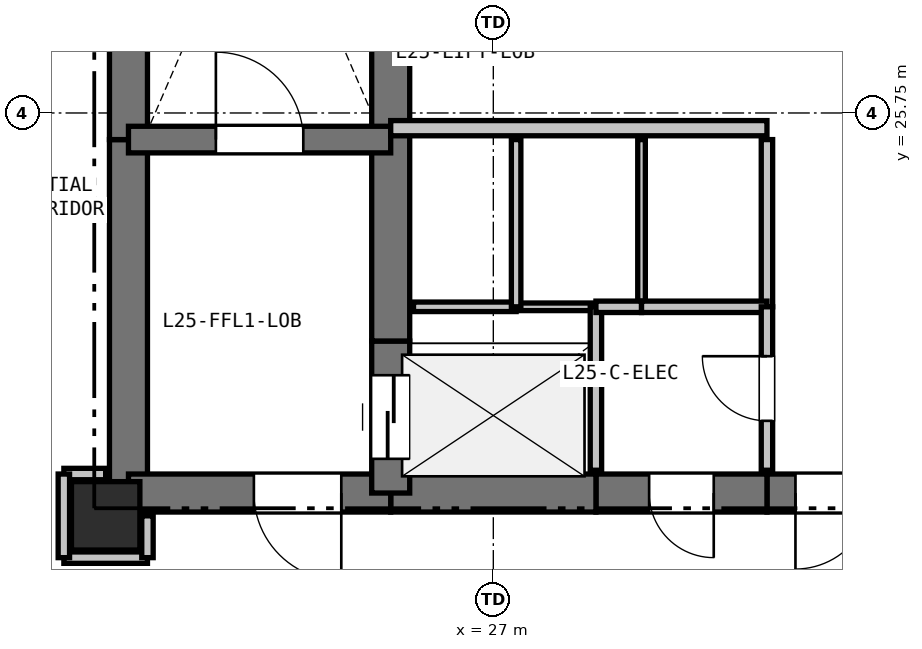
"""IFC4 building model, lengths in metres.
Left out: names, types, materials, properties, quantities, classifications, styles, units other than length and angle.
Written with IfcOpenShell. Run it as: python <this file> out.ifc"""

import sys

from ifc_helpers import new_model, si_unit, direction, frame, frame_2d, origin, origin_2d, place, context, subcontext, project, spatial, rectangle, extrude, element, fill, save


model = new_model("IFC4")
c1 = context("Model", 3, precision=1e-05, world=origin(), true_north=direction((0.0, 1.0)))
c2 = subcontext(c1, "Body", "Model", "MODEL_VIEW")
j1 = project(units=[si_unit("LENGTHUNIT", "METRE"), si_unit("PLANEANGLEUNIT", "RADIAN")], contexts=[c1])
p1 = place(None, origin())
s1 = spatial("IfcSite", under=j1, at=p1, CompositionType="ELEMENT")
p2 = place(p1, origin())
s2 = spatial("IfcBuilding", under=s1, at=p2, CompositionType="ELEMENT")
p3 = place(p2, frame((0.0, 0.0, 93.3)))
s3 = spatial("IfcBuildingStorey", under=s2, at=p3, CompositionType="ELEMENT", Elevation=93.3)
p4 = place(p3, frame((21.9, 20.45, 0.0), z_axis=(0.0, 0.0, 1.0), x_axis=(1.0, 0.0, 0.0)))
e1 = element("IfcColumn", 1, at=p4, inside=s3, PredefinedType="COLUMN", context=c2, shape_type="SweptSolid", body=[
    extrude(rectangle(XDim=0.9, YDim=0.9, at=origin_2d()), origin(), (0.0, 0.0, 1.0), 3.3),
])
p5 = place(p3, frame((22.2, 20.75, 0.0), z_axis=(0.0, 0.0, 1.0), x_axis=(0.0, 1.0, 0.0)))
e2 = element("IfcWall", 2, at=p5, inside=s3, PredefinedType="SHEAR", context=c2, shape_type="SweptSolid", body=[
    extrude(rectangle(XDim=4.65, YDim=0.5, at=frame_2d((2.325, 0.0))), origin(), (0.0, 0.0, 1.0), 3.05),
])
p6 = place(p3, frame((22.2, 25.4, 0.0), z_axis=(0.0, 0.0, 1.0), x_axis=(0.0, 1.0, 0.0)))
e3 = element("IfcWall", 3, at=p6, inside=s3, PredefinedType="SHEAR", context=c2, shape_type="SweptSolid", body=[
    extrude(rectangle(XDim=7.35, YDim=0.5, at=frame_2d((3.675, 0.0))), origin(), (0.0, 0.0, 1.0), 3.05),
])
p7 = place(p3, frame((32.35, 20.75, 0.0), z_axis=(0.0, 0.0, 1.0), x_axis=(-1.0, 0.0, 0.0)))
e4 = element("IfcWall", 4, at=p7, inside=s3, PredefinedType="SHEAR", context=c2, shape_type="SweptSolid", body=[
    extrude(rectangle(XDim=1.75, YDim=0.5, at=frame_2d((0.875, 0.0))), origin(), (0.0, 0.0, 1.0), 3.05),
])
p8 = place(p7, frame((0.375, 0.0, 0.0)))
e5 = element("IfcOpeningElement", 5, at=p8, cuts=e4, PredefinedType="OPENING", context=c2, shape_type="SweptSolid", body=[
    extrude(rectangle(XDim=1.0, YDim=2.15, at=frame_2d((0.5, 1.075))), frame((0.0, 0.26, 0.0), z_axis=(0.0, -1.0, 0.0), x_axis=(1.0, 0.0, 0.0)), (0.0, 0.0, 1.0), 0.52),
])
p9 = place(p3, frame((30.6, 20.75, 0.0), z_axis=(0.0, 0.0, 1.0), x_axis=(-1.0, 0.0, 0.0)))
e6 = element("IfcWall", 6, at=p9, inside=s3, PredefinedType="SHEAR", context=c2, shape_type="SweptSolid", body=[
    extrude(rectangle(XDim=2.25, YDim=0.5, at=frame_2d((1.125, 0.0))), origin(), (0.0, 0.0, 1.0), 3.05),
])
p10 = place(p9, frame((0.7, 0.0, 0.0)))
e7 = element("IfcOpeningElement", 7, at=p10, cuts=e6, PredefinedType="OPENING", context=c2, shape_type="SweptSolid", body=[
    extrude(rectangle(XDim=0.85, YDim=2.1, at=frame_2d((0.425, 1.05))), frame((0.0, 0.26, 0.0), z_axis=(0.0, -1.0, 0.0), x_axis=(1.0, 0.0, 0.0)), (0.0, 0.0, 1.0), 0.52),
])
p11 = place(p3, frame((28.35, 20.75, 0.0), z_axis=(0.0, 0.0, 1.0), x_axis=(-1.0, 0.0, 0.0)))
e8 = element("IfcWall", 8, at=p11, inside=s3, PredefinedType="SHEAR", context=c2, shape_type="SweptSolid", body=[
    extrude(rectangle(XDim=2.7, YDim=0.5, at=frame_2d((1.35, 0.0))), origin(), (0.0, 0.0, 1.0), 3.05),
])
p12 = place(p3, frame((25.65, 20.75, 0.0), z_axis=(0.0, 0.0, 1.0), x_axis=(-1.0, 0.0, 0.0)))
e9 = element("IfcWall", 9, at=p12, inside=s3, PredefinedType="SHEAR", context=c2, shape_type="SweptSolid", body=[
    extrude(rectangle(XDim=3.45, YDim=0.5, at=frame_2d((1.725, 0.0))), origin(), (0.0, 0.0, 1.0), 3.05),
])
p13 = place(p12, frame((0.65, 0.0, 0.0)))
e10 = element("IfcOpeningElement", 10, at=p13, cuts=e9, PredefinedType="OPENING", context=c2, shape_type="SweptSolid", body=[
    extrude(rectangle(XDim=1.15, YDim=2.15, at=frame_2d((0.575, 1.075))), frame((0.0, 0.26, 0.0), z_axis=(0.0, -1.0, 0.0), x_axis=(1.0, 0.0, 0.0)), (0.0, 0.0, 1.0), 0.52),
])
p14 = place(p3, frame((25.65, 20.75, 0.0), z_axis=(0.0, 0.0, 1.0), x_axis=(0.0, 1.0, 0.0)))
e11 = element("IfcWall", 11, at=p14, inside=s3, PredefinedType="SHEAR", context=c2, shape_type="SweptSolid", body=[
    extrude(rectangle(XDim=2.0, YDim=0.5, at=frame_2d((1.0, 0.0))), origin(), (0.0, 0.0, 1.0), 3.05),
])
p15 = place(p14, frame((0.45, 0.0, 0.0)))
e12 = element("IfcOpeningElement", 12, at=p15, cuts=e11, PredefinedType="OPENING", context=c2, shape_type="SweptSolid", body=[
    extrude(rectangle(XDim=1.1, YDim=2.15, at=frame_2d((0.55, 1.075))), frame((0.0, 0.26, 0.0), z_axis=(0.0, -1.0, 0.0), x_axis=(1.0, 0.0, 0.0)), (0.0, 0.0, 1.0), 0.52),
])
p16 = place(p3, frame((25.65, 22.75, 0.0), z_axis=(0.0, 0.0, 1.0), x_axis=(0.0, 1.0, 0.0)))
e13 = element("IfcWall", 13, at=p16, inside=s3, PredefinedType="SHEAR", context=c2, shape_type="SweptSolid", body=[
    extrude(rectangle(XDim=2.8, YDim=0.5, at=frame_2d((1.4, 0.0))), origin(), (0.0, 0.0, 1.0), 3.05),
])
p17 = place(p3, frame((25.65, 25.55, 0.0), z_axis=(0.0, 0.0, 1.0), x_axis=(0.0, 1.0, 0.0)))
e14 = element("IfcWall", 14, at=p17, inside=s3, PredefinedType="SHEAR", context=c2, shape_type="SweptSolid", body=[
    extrude(rectangle(XDim=2.4, YDim=0.5, at=frame_2d((1.2, 0.0))), origin(), (0.0, 0.0, 1.0), 3.05),
])
p18 = place(p3, frame((22.2, 25.4, 0.0), z_axis=(0.0, 0.0, 1.0), x_axis=(1.0, 0.0, 0.0)))
e15 = element("IfcWall", 15, at=p18, inside=s3, PredefinedType="SHEAR", context=c2, shape_type="SweptSolid", body=[
    extrude(rectangle(XDim=3.45, YDim=0.35, at=frame_2d((1.725, 0.0))), origin(), (0.0, 0.0, 1.0), 3.05),
])
p19 = place(p18, frame((1.15, 0.0, 0.0)))
e16 = element("IfcOpeningElement", 16, at=p19, cuts=e15, PredefinedType="OPENING", context=c2, shape_type="SweptSolid", body=[
    extrude(rectangle(XDim=1.15, YDim=2.15, at=frame_2d((0.575, 1.075))), frame((0.0, 0.185, 0.0), z_axis=(0.0, -1.0, 0.0), x_axis=(1.0, 0.0, 0.0)), (0.0, 0.0, 1.0), 0.37),
])
p20 = place(p3, frame((25.65, 25.55, 0.0), z_axis=(0.0, 0.0, 1.0), x_axis=(1.0, 0.0, 0.0)))
e17 = element("IfcWall", 17, at=p20, inside=s3, PredefinedType="PARTITIONING", context=c2, shape_type="SweptSolid", body=[
    extrude(rectangle(XDim=4.95, YDim=0.2, at=frame_2d((2.475, 0.0))), origin(), (0.0, 0.0, 1.0), 3.05),
])
p21 = place(p3, frame((25.95, 23.2, 0.0), z_axis=(0.0, 0.0, 1.0), x_axis=(1.0, 0.0, 0.0)))
e18 = element("IfcWall", 18, at=p21, inside=s3, PredefinedType="PARTITIONING", context=c2, shape_type="SweptSolid", body=[
    extrude(rectangle(XDim=1.35, YDim=0.125, at=frame_2d((0.675, 0.0))), origin(), (0.0, 0.0, 1.0), 3.05),
])
p22 = place(p3, frame((27.3, 23.2, 0.0), z_axis=(0.0, 0.0, 1.0), x_axis=(1.0, 0.0, 0.0)))
e19 = element("IfcWall", 19, at=p22, inside=s3, PredefinedType="PARTITIONING", context=c2, shape_type="SweptSolid", body=[
    extrude(rectangle(XDim=1.05, YDim=0.1, at=frame_2d((0.525, 0.0))), origin(), (0.0, 0.0, 1.0), 3.05),
])
p23 = place(p3, frame((28.35, 23.2, 0.0), z_axis=(0.0, 0.0, 1.0), x_axis=(0.0, -1.0, 0.0)))
e20 = element("IfcWall", 20, at=p23, inside=s3, PredefinedType="PARTITIONING", context=c2, shape_type="SweptSolid", body=[
    extrude(rectangle(XDim=2.15, YDim=0.15, at=frame_2d((1.075, 0.0))), origin(), (0.0, 0.0, 1.0), 3.05),
])
p24 = place(p3, frame((27.3, 25.4, 0.0), z_axis=(0.0, 0.0, 1.0), x_axis=(0.0, -1.0, 0.0)))
e21 = element("IfcWall", 21, at=p24, inside=s3, PredefinedType="PARTITIONING", context=c2, shape_type="SweptSolid", body=[
    extrude(rectangle(XDim=2.2, YDim=0.125, at=frame_2d((1.1, 0.0))), origin(), (0.0, 0.0, 1.0), 3.05),
])
p25 = place(p3, frame((28.95, 25.4, 0.0), z_axis=(0.0, 0.0, 1.0), x_axis=(0.0, -1.0, 0.0)))
e22 = element("IfcWall", 22, at=p25, inside=s3, PredefinedType="PARTITIONING", context=c2, shape_type="SweptSolid", body=[
    extrude(rectangle(XDim=2.2, YDim=0.1, at=frame_2d((1.1, 0.0))), origin(), (0.0, 0.0, 1.0), 3.05),
])
p26 = place(p3, frame((28.95, 23.2, 0.0), z_axis=(0.0, 0.0, 1.0), x_axis=(-1.0, 0.0, 0.0)))
e23 = element("IfcWall", 23, at=p26, inside=s3, PredefinedType="PARTITIONING", context=c2, shape_type="SweptSolid", body=[
    extrude(rectangle(XDim=0.6, YDim=0.15, at=frame_2d((0.3, 0.0))), origin(), (0.0, 0.0, 1.0), 3.05),
])
p27 = place(p3, frame((30.6, 25.4, 0.0), z_axis=(0.0, 0.0, 1.0), x_axis=(0.0, -1.0, 0.0)))
e24 = element("IfcWall", 24, at=p27, inside=s3, PredefinedType="PARTITIONING", context=c2, shape_type="SweptSolid", body=[
    extrude(rectangle(XDim=2.2, YDim=0.15, at=frame_2d((1.1, 0.0))), origin(), (0.0, 0.0, 1.0), 3.05),
])
p28 = place(p3, frame((30.6, 23.2, 0.0), z_axis=(0.0, 0.0, 1.0), x_axis=(-1.0, 0.0, 0.0)))
e25 = element("IfcWall", 25, at=p28, inside=s3, PredefinedType="PARTITIONING", context=c2, shape_type="SweptSolid", body=[
    extrude(rectangle(XDim=1.65, YDim=0.15, at=frame_2d((0.825, 0.0))), origin(), (0.0, 0.0, 1.0), 3.05),
])
p29 = place(p3, frame((30.6, 21.05, 0.0), z_axis=(0.0, 0.0, 1.0), x_axis=(0.0, 1.0, 0.0)))
e26 = element("IfcWall", 26, at=p29, inside=s3, PredefinedType="PARTITIONING", context=c2, shape_type="SweptSolid", body=[
    extrude(rectangle(XDim=2.15, YDim=0.15, at=frame_2d((1.075, 0.0))), origin(), (0.0, 0.0, 1.0), 3.05),
])
p30 = place(p29, frame((0.65, 0.0, 0.0)))
e27 = element("IfcOpeningElement", 27, at=p30, cuts=e26, PredefinedType="OPENING", context=c2, shape_type="SweptSolid", body=[
    extrude(rectangle(XDim=0.85, YDim=2.1, at=frame_2d((0.425, 1.05))), frame((0.0, 0.085, 0.0), z_axis=(0.0, -1.0, 0.0), x_axis=(1.0, 0.0, 0.0)), (0.0, 0.0, 1.0), 0.17),
])
p31 = place(p3, frame((21.35, 19.9, 0.0), z_axis=(0.0, 0.0, 1.0), x_axis=(1.0, 0.0, 0.0)))
e28 = element("IfcWall", 28, at=p31, inside=s3, PredefinedType="PARTITIONING", context=c2, shape_type="SweptSolid", body=[
    extrude(rectangle(XDim=1.1, YDim=0.15, at=frame_2d((0.55, 0.0))), origin(), (0.0, 0.0, 1.0), 2.423),
])
p32 = place(p3, frame((22.45, 19.9, 0.0), z_axis=(0.0, 0.0, 1.0), x_axis=(0.0, 1.0, 0.0)))
e29 = element("IfcWall", 29, at=p32, inside=s3, PredefinedType="PARTITIONING", context=c2, shape_type="SweptSolid", body=[
    extrude(rectangle(XDim=0.55, YDim=0.15, at=frame_2d((0.275, 0.0))), origin(), (0.0, 0.0, 1.0), 2.423),
])
p33 = place(p3, frame((21.9, 21.0, 0.0), z_axis=(0.0, 0.0, 1.0), x_axis=(-1.0, 0.0, 0.0)))
e30 = element("IfcWall", 30, at=p33, inside=s3, PredefinedType="PARTITIONING", context=c2, shape_type="SweptSolid", body=[
    extrude(rectangle(XDim=0.55, YDim=0.15, at=frame_2d((0.275, 0.0))), origin(), (0.0, 0.0, 1.0), 2.498),
])
p34 = place(p3, frame((21.35, 21.0, 0.0), z_axis=(0.0, 0.0, 1.0), x_axis=(0.0, -1.0, 0.0)))
e31 = element("IfcWall", 31, at=p34, inside=s3, PredefinedType="PARTITIONING", context=c2, shape_type="SweptSolid", body=[
    extrude(rectangle(XDim=1.1, YDim=0.15, at=frame_2d((0.55, 0.0))), origin(), (0.0, 0.0, 1.0), 2.423),
])
p35 = place(p8, origin())
e32 = element("IfcDoor", 32, at=p35, inside=s3, OperationType="SINGLE_SWING_RIGHT", PredefinedType="DOOR", context=c2, shape_type="SweptSolid", body=[
    extrude(rectangle(XDim=1.0, YDim=2.15, at=frame_2d((0.5, 1.075))), frame((0.0, 0.025, 0.0), z_axis=(0.0, -1.0, 0.0), x_axis=(1.0, 0.0, 0.0)), (0.0, 0.0, 1.0), 0.05),
])
fill(e5, e32)
p36 = place(p15, origin())
e33 = element("IfcDoor", 33, at=p36, inside=s3, OperationType="SLIDING_TO_LEFT", PredefinedType="DOOR", context=c2, shape_type="SweptSolid", body=[
    extrude(rectangle(XDim=1.1, YDim=2.15, at=frame_2d((0.55, 1.075))), frame((0.0, 0.025, 0.0), z_axis=(0.0, -1.0, 0.0), x_axis=(1.0, 0.0, 0.0)), (0.0, 0.0, 1.0), 0.05),
])
fill(e12, e33)
p37 = place(p19, origin())
e34 = element("IfcDoor", 34, at=p37, inside=s3, OperationType="SINGLE_SWING_LEFT", PredefinedType="DOOR", context=c2, shape_type="SweptSolid", body=[
    extrude(rectangle(XDim=1.15, YDim=2.15, at=frame_2d((0.575, 1.075))), frame((0.0, 0.025, 0.0), z_axis=(0.0, -1.0, 0.0), x_axis=(1.0, 0.0, 0.0)), (0.0, 0.0, 1.0), 0.05),
])
fill(e16, e34)
p38 = place(p13, origin())
e35 = element("IfcDoor", 35, at=p38, inside=s3, OperationType="SINGLE_SWING_LEFT", PredefinedType="DOOR", context=c2, shape_type="SweptSolid", body=[
    extrude(rectangle(XDim=1.15, YDim=2.15, at=frame_2d((0.575, 1.075))), frame((0.0, 0.025, 0.0), z_axis=(0.0, -1.0, 0.0), x_axis=(1.0, 0.0, 0.0)), (0.0, 0.0, 1.0), 0.05),
])
fill(e10, e35)
p39 = place(p30, origin())
e36 = element("IfcDoor", 36, at=p39, inside=s3, OperationType="SINGLE_SWING_RIGHT", PredefinedType="DOOR", context=c2, shape_type="SweptSolid", body=[
    extrude(rectangle(XDim=0.85, YDim=2.1, at=frame_2d((0.425, 1.05))), frame((0.0, 0.025, 0.0), z_axis=(0.0, -1.0, 0.0), x_axis=(1.0, 0.0, 0.0)), (0.0, 0.0, 1.0), 0.05),
])
fill(e27, e36)
p40 = place(p10, origin())
e37 = element("IfcDoor", 37, at=p40, inside=s3, OperationType="SINGLE_SWING_LEFT", PredefinedType="DOOR", context=c2, shape_type="SweptSolid", body=[
    extrude(rectangle(XDim=0.85, YDim=2.1, at=frame_2d((0.425, 1.05))), frame((0.0, 0.025, 0.0), z_axis=(0.0, -1.0, 0.0), x_axis=(1.0, 0.0, 0.0)), (0.0, 0.0, 1.0), 0.05),
])
fill(e7, e37)
save(model, sys.argv[1])
